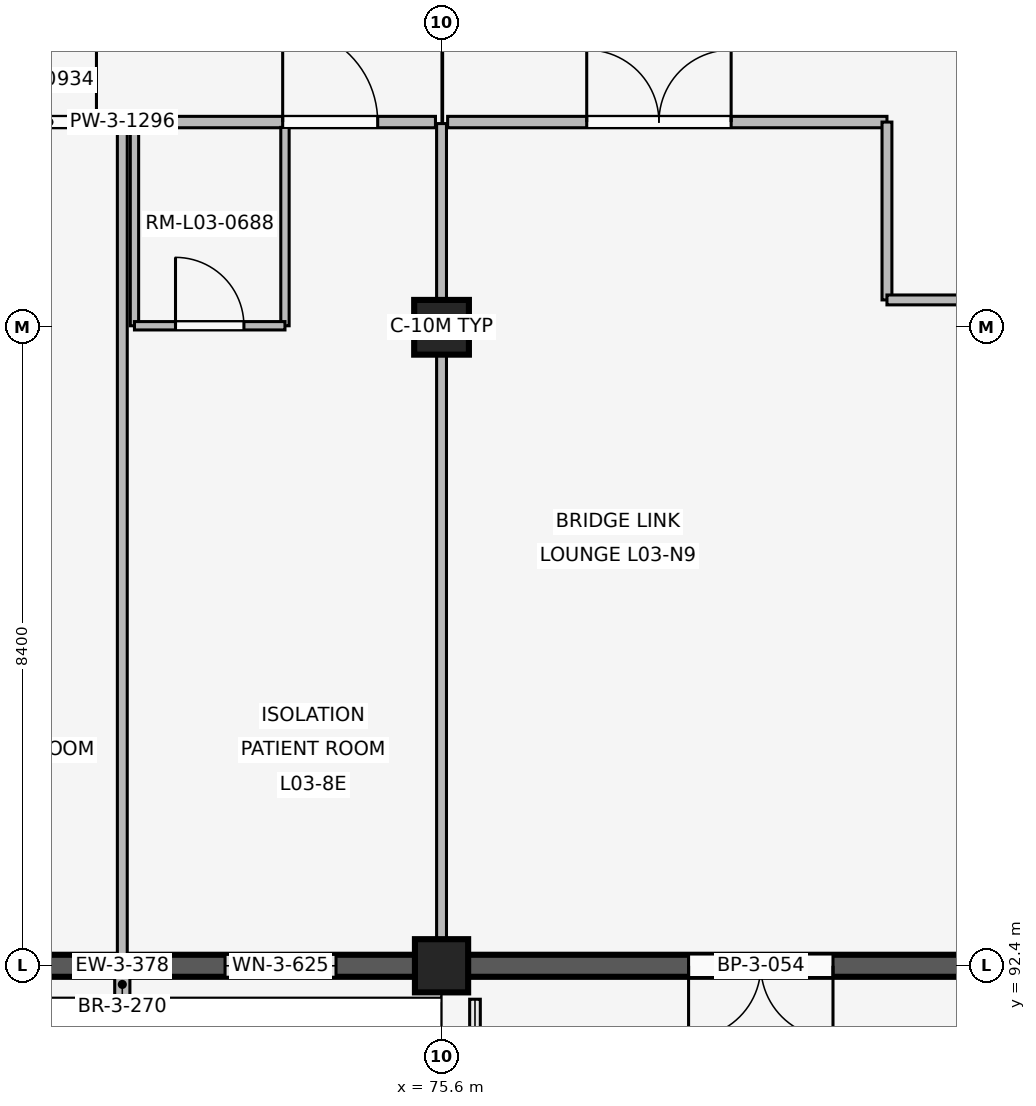
"""IFC4 building model, lengths in metres.
Left out: names, types, materials, properties, quantities, classifications, styles, units other than length and angle.
Written with IfcOpenShell. Run it as: python <this file> out.ifc"""

import sys

from ifc_helpers import new_model, si_unit, direction, frame, frame_2d, origin, origin_2d, place, context, subcontext, project, spatial, rectangle, extrude, element, fill, save


model = new_model("IFC4")
c1 = context("Model", 3, precision=1e-05, world=origin(), true_north=direction((0.0, 1.0)))
c2 = subcontext(c1, "Body", "Model", "MODEL_VIEW")
j1 = project(units=[si_unit("LENGTHUNIT", "METRE"), si_unit("PLANEANGLEUNIT", "RADIAN")], contexts=[c1])
p1 = place(None, origin())
s1 = spatial("IfcSite", under=j1, at=p1, CompositionType="ELEMENT")
p2 = place(p1, origin())
s2 = spatial("IfcBuilding", under=s1, at=p2, CompositionType="ELEMENT")
p3 = place(p2, frame((0.0, 0.0, 12.9)))
s3 = spatial("IfcBuildingStorey", under=s2, at=p3, CompositionType="ELEMENT", Elevation=12.9)
p4 = place(p3, frame((75.6, 92.4, 0.0), z_axis=(0.0, 0.0, 1.0), x_axis=(1.0, 0.0, 0.0)))
e1 = element("IfcColumn", 1, at=p4, inside=s3, PredefinedType="COLUMN", context=c2, shape_type="SweptSolid", body=[
    extrude(rectangle(XDim=0.7, YDim=0.7, at=origin_2d()), origin(), (0.0, 0.0, 1.0), 3.3),
])
p5 = place(p3, frame((75.6, 100.8, 0.0), z_axis=(0.0, 0.0, 1.0), x_axis=(1.0, 0.0, 0.0)))
e2 = element("IfcColumn", 2, at=p5, inside=s3, PredefinedType="COLUMN", context=c2, shape_type="SweptSolid", body=[
    extrude(rectangle(XDim=0.72, YDim=0.72, at=origin_2d()), origin(), (0.0, 0.0, 1.0), 3.3),
])
p6 = place(p3, frame((75.255, 92.4, 0.0), z_axis=(0.0, 0.0, 1.0), x_axis=(-1.0, 0.0, 0.0)))
e3 = element("IfcWall", 3, at=p6, inside=s3, PredefinedType="SOLIDWALL", context=c2, shape_type="SweptSolid", body=[
    extrude(rectangle(XDim=7.71, YDim=0.29, at=frame_2d((3.855, 0.0))), origin(), (0.0, 0.0, 1.0), 2.44),
])
p7 = place(p6, frame((1.043, 0.0, 0.85)))
e4 = element("IfcOpeningElement", 4, at=p7, cuts=e3, PredefinedType="OPENING", context=c2, shape_type="SweptSolid", body=[
    extrude(rectangle(XDim=1.46, YDim=0.85, at=frame_2d((0.73, 0.425))), frame((0.0, 0.155, 0.0), z_axis=(0.0, -1.0, 0.0), x_axis=(1.0, 0.0, 0.0)), (0.0, 0.0, 1.0), 0.31),
])
p8 = place(p6, frame((5.207, 0.0, 0.85)))
e5 = element("IfcOpeningElement", 5, at=p8, cuts=e3, PredefinedType="OPENING", context=c2, shape_type="SweptSolid", body=[
    extrude(rectangle(XDim=1.46, YDim=0.85, at=frame_2d((0.73, 0.425))), frame((0.0, 0.155, 0.0), z_axis=(0.0, -1.0, 0.0), x_axis=(1.0, 0.0, 0.0)), (0.0, 0.0, 1.0), 0.31),
])
p9 = place(p3, frame((71.4, 92.325, 0.0), z_axis=(0.0, 0.0, 1.0), x_axis=(0.0, -1.0, 0.0)))
e6 = element("IfcWall", 6, at=p9, inside=s3, PredefinedType="ELEMENTEDWALL", context=c2, shape_type="SweptSolid", body=[
    extrude(rectangle(XDim=0.34, YDim=0.2, at=frame_2d((0.17, 0.0))), origin(), (0.0, 0.0, 1.0), 2.42),
])
p10 = place(p3, frame((83.655, 92.4, 0.0), z_axis=(0.0, 0.0, 1.0), x_axis=(-1.0, 0.0, 0.0)))
e7 = element("IfcWall", 7, at=p10, inside=s3, PredefinedType="SOLIDWALL", context=c2, shape_type="SweptSolid", body=[
    extrude(rectangle(XDim=7.71, YDim=0.29, at=frame_2d((3.855, 0.0))), origin(), (0.0, 0.0, 1.0), 2.44),
])
p11 = place(p10, frame((2.905, 0.0, 0.0)))
e8 = element("IfcOpeningElement", 8, at=p11, cuts=e7, PredefinedType="OPENING", context=c2, shape_type="SweptSolid", body=[
    extrude(rectangle(XDim=1.9, YDim=2.32, at=frame_2d((0.95, 1.16))), frame((0.0, 0.155, 0.0), z_axis=(0.0, -1.0, 0.0), x_axis=(1.0, 0.0, 0.0)), (0.0, 0.0, 1.0), 0.31),
])
p12 = place(p3, frame((67.28, 103.5, 0.0), z_axis=(0.0, 0.0, 1.0), x_axis=(1.0, 0.0, 0.0)))
e9 = element("IfcWall", 9, at=p12, inside=s3, PredefinedType="PARTITIONING", context=c2, shape_type="SweptSolid", body=[
    extrude(rectangle(XDim=8.24, YDim=0.15, at=frame_2d((4.12, 0.0))), origin(), (0.0, 0.0, 1.0), 2.42),
])
p13 = place(p12, frame((2.53, 0.0, 0.0)))
e10 = element("IfcOpeningElement", 10, at=p13, cuts=e9, PredefinedType="OPENING", context=c2, shape_type="SweptSolid", body=[
    extrude(rectangle(XDim=1.25, YDim=2.2, at=frame_2d((0.625, 1.1))), frame((0.0, 0.085, 0.0), z_axis=(0.0, -1.0, 0.0), x_axis=(1.0, 0.0, 0.0)), (0.0, 0.0, 1.0), 0.17),
])
p14 = place(p12, frame((6.23, 0.0, 0.0)))
e11 = element("IfcOpeningElement", 11, at=p14, cuts=e9, PredefinedType="OPENING", context=c2, shape_type="SweptSolid", body=[
    extrude(rectangle(XDim=1.25, YDim=2.2, at=frame_2d((0.625, 1.1))), frame((0.0, 0.085, 0.0), z_axis=(0.0, -1.0, 0.0), x_axis=(1.0, 0.0, 0.0)), (0.0, 0.0, 1.0), 0.17),
])
p15 = place(p3, frame((71.4, 92.5, 0.0), z_axis=(0.0, 0.0, 1.0), x_axis=(0.0, 1.0, 0.0)))
e12 = element("IfcWall", 12, at=p15, inside=s3, PredefinedType="PARTITIONING", context=c2, shape_type="SweptSolid", body=[
    extrude(rectangle(XDim=10.93, YDim=0.13, at=frame_2d((5.465, 0.0))), origin(), (0.0, 0.0, 1.0), 2.42),
])
for number, where, z_axis, x_axis in (
    (13, (71.56, 100.82, 0.0), (0.0, 0.0, 1.0), (0.0, 1.0, 0.0)),
    (14, (73.54, 100.82, 0.0), (0.0, 0.0, 1.0), (0.0, 1.0, 0.0)),
):
    element("IfcWall", number, at=place(p3, frame(where, z_axis=z_axis, x_axis=x_axis)), inside=s3, PredefinedType="PARTITIONING", context=c2, shape_type="SweptSolid", body=[
        extrude(rectangle(XDim=2.61, YDim=0.11, at=frame_2d((1.305, 0.0))), origin(), (0.0, 0.0, 1.0), 2.42),
    ])
p16 = place(p3, frame((71.56, 100.82, 0.0), z_axis=(0.0, 0.0, 1.0), x_axis=(1.0, 0.0, 0.0)))
e15 = element("IfcWall", 15, at=p16, inside=s3, PredefinedType="PARTITIONING", context=c2, shape_type="SweptSolid", body=[
    extrude(rectangle(XDim=1.98, YDim=0.11, at=frame_2d((0.99, 0.0))), origin(), (0.0, 0.0, 1.0), 2.42),
])
p17 = place(p16, frame((0.54, 0.0, 0.0)))
e16 = element("IfcOpeningElement", 16, at=p17, cuts=e15, PredefinedType="OPENING", context=c2, shape_type="SweptSolid", body=[
    extrude(rectangle(XDim=0.9, YDim=2.1, at=frame_2d((0.45, 1.05))), frame((0.0, 0.065, 0.0), z_axis=(0.0, -1.0, 0.0), x_axis=(1.0, 0.0, 0.0)), (0.0, 0.0, 1.0), 0.13),
])
p18 = place(p3, frame((75.6, 92.54, 0.0), z_axis=(0.0, 0.0, 1.0), x_axis=(0.0, 1.0, 0.0)))
e17 = element("IfcWall", 17, at=p18, inside=s3, PredefinedType="PARTITIONING", context=c2, shape_type="SweptSolid", body=[
    extrude(rectangle(XDim=10.94, YDim=0.13, at=frame_2d((5.47, 0.0))), origin(), (0.0, 0.0, 1.0), 2.42),
])
p19 = place(p3, frame((75.68, 103.5, 0.0), z_axis=(0.0, 0.0, 1.0), x_axis=(1.0, 0.0, 0.0)))
e18 = element("IfcWall", 18, at=p19, inside=s3, PredefinedType="PARTITIONING", context=c2, shape_type="SweptSolid", body=[
    extrude(rectangle(XDim=5.78, YDim=0.15, at=frame_2d((2.89, 0.0))), origin(), (0.0, 0.0, 1.0), 2.42),
])
p20 = place(p19, frame((1.83, 0.0, 0.0)))
e19 = element("IfcOpeningElement", 19, at=p20, cuts=e18, PredefinedType="OPENING", context=c2, shape_type="SweptSolid", body=[
    extrude(rectangle(XDim=1.9, YDim=2.34, at=frame_2d((0.95, 1.17))), frame((0.0, 0.085, 0.0), z_axis=(0.0, -1.0, 0.0), x_axis=(1.0, 0.0, 0.0)), (0.0, 0.0, 1.0), 0.17),
])
p21 = place(p3, frame((81.46, 101.16, 0.0), z_axis=(0.0, 0.0, 1.0), x_axis=(0.0, 1.0, 0.0)))
e20 = element("IfcWall", 20, at=p21, inside=s3, PredefinedType="PARTITIONING", context=c2, shape_type="SweptSolid", body=[
    extrude(rectangle(XDim=2.34, YDim=0.13, at=frame_2d((1.17, 0.0))), origin(), (0.0, 0.0, 1.0), 2.42),
])
p22 = place(p3, frame((81.46, 101.16, 0.0), z_axis=(0.0, 0.0, 1.0), x_axis=(1.0, 0.0, 0.0)))
e21 = element("IfcWall", 21, at=p22, inside=s3, PredefinedType="PARTITIONING", context=c2, shape_type="SweptSolid", body=[
    extrude(rectangle(XDim=2.18, YDim=0.13, at=frame_2d((1.09, 0.0))), origin(), (0.0, 0.0, 1.0), 2.42),
])
p23 = place(p7, origin())
e22 = element("IfcWindow", 22, at=p23, inside=s3, PartitioningType="SINGLE_PANEL", PredefinedType="WINDOW", context=c2, shape_type="SweptSolid", body=[
    extrude(rectangle(XDim=1.46, YDim=0.85, at=frame_2d((0.73, 0.425))), frame((0.0, 0.03, 0.0), z_axis=(0.0, -1.0, 0.0), x_axis=(1.0, 0.0, 0.0)), (0.0, 0.0, 1.0), 0.06),
])
fill(e4, e22)
p24 = place(p11, origin())
e23 = element("IfcDoor", 23, at=p24, inside=s3, OperationType="DOUBLE_SWING_LEFT", PredefinedType="DOOR", context=c2, shape_type="SweptSolid", body=[
    extrude(rectangle(XDim=1.9, YDim=2.32, at=frame_2d((0.95, 1.16))), frame((0.0, 0.025, 0.0), z_axis=(0.0, -1.0, 0.0), x_axis=(1.0, 0.0, 0.0)), (0.0, 0.0, 1.0), 0.05),
])
fill(e8, e23)
p25 = place(p13, origin())
e24 = element("IfcDoor", 24, at=p25, inside=s3, OperationType="SINGLE_SWING_RIGHT", PredefinedType="DOOR", context=c2, shape_type="SweptSolid", body=[
    extrude(rectangle(XDim=1.25, YDim=2.2, at=frame_2d((0.625, 1.1))), frame((0.0, 0.025, 0.0), z_axis=(0.0, -1.0, 0.0), x_axis=(1.0, 0.0, 0.0)), (0.0, 0.0, 1.0), 0.05),
])
fill(e10, e24)
p26 = place(p14, origin())
e25 = element("IfcDoor", 25, at=p26, inside=s3, OperationType="SINGLE_SWING_LEFT", PredefinedType="DOOR", context=c2, shape_type="SweptSolid", body=[
    extrude(rectangle(XDim=1.25, YDim=2.2, at=frame_2d((0.625, 1.1))), frame((0.0, 0.025, 0.0), z_axis=(0.0, -1.0, 0.0), x_axis=(1.0, 0.0, 0.0)), (0.0, 0.0, 1.0), 0.05),
])
fill(e11, e25)
p27 = place(p17, origin())
e26 = element("IfcDoor", 26, at=p27, inside=s3, OperationType="SINGLE_SWING_LEFT", PredefinedType="DOOR", context=c2, shape_type="SweptSolid", body=[
    extrude(rectangle(XDim=0.9, YDim=2.1, at=frame_2d((0.45, 1.05))), frame((0.0, 0.025, 0.0), z_axis=(0.0, -1.0, 0.0), x_axis=(1.0, 0.0, 0.0)), (0.0, 0.0, 1.0), 0.05),
])
fill(e16, e26)
p28 = place(p20, origin())
e27 = element("IfcDoor", 27, at=p28, inside=s3, OperationType="DOUBLE_SWING_LEFT", PredefinedType="DOOR", context=c2, shape_type="SweptSolid", body=[
    extrude(rectangle(XDim=1.9, YDim=2.34, at=frame_2d((0.95, 1.17))), frame((0.0, 0.025, 0.0), z_axis=(0.0, -1.0, 0.0), x_axis=(1.0, 0.0, 0.0)), (0.0, 0.0, 1.0), 0.05),
])
fill(e19, e27)
save(model, sys.argv[1])
